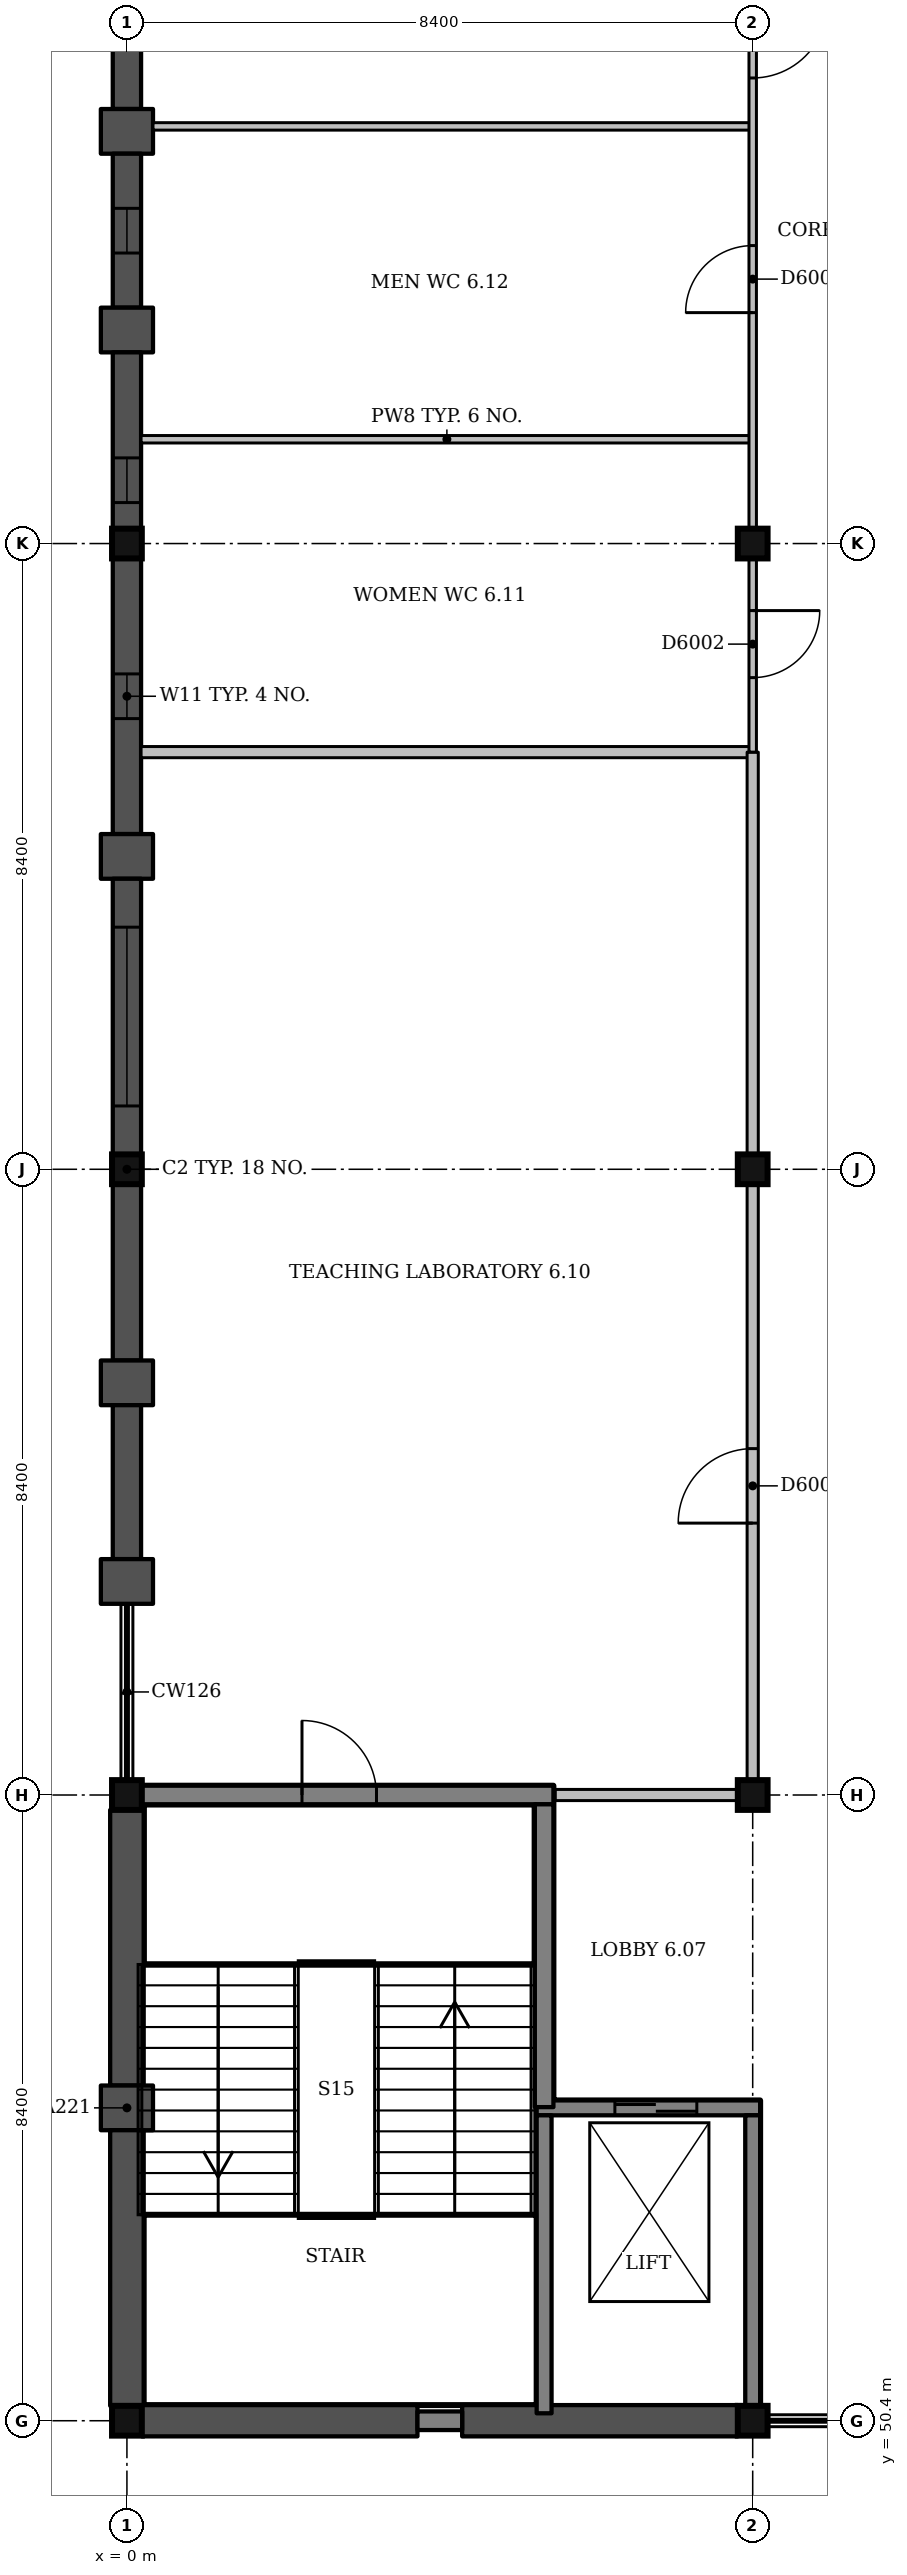
"""IFC4 building model, lengths in metres.
Left out: names, types, materials, properties, quantities, classifications, styles, units other than length and angle.
Written with IfcOpenShell. Run it as: python <this file> out.ifc"""

import sys

from ifc_helpers import new_model, si_unit, direction, frame, frame_2d, origin, origin_2d, place, context, subcontext, project, spatial, rectangle, extrude, element, fill, save


model = new_model("IFC4")
c1 = context("Model", 3, precision=1e-05, world=origin(), true_north=direction((0.0, 1.0)))
c2 = subcontext(c1, "Body", "Model", "MODEL_VIEW")
j1 = project(units=[si_unit("LENGTHUNIT", "METRE"), si_unit("PLANEANGLEUNIT", "RADIAN")], contexts=[c1])
p1 = place(None, origin())
s1 = spatial("IfcSite", under=j1, at=p1, CompositionType="ELEMENT")
p2 = place(p1, origin())
s2 = spatial("IfcBuilding", under=s1, at=p2, CompositionType="ELEMENT")
p3 = place(p2, frame((0.0, 0.0, 27.0)))
s3 = spatial("IfcBuildingStorey", under=s2, at=p3, CompositionType="ELEMENT", Elevation=27.0)
for number, where, z_axis, x_axis in (
    (1, (0.0, 50.4, 0.0), (0.0, 0.0, 1.0), (1.0, 0.0, 0.0)),
    (2, (0.0, 58.8, 0.0), (0.0, 0.0, 1.0), (1.0, 0.0, 0.0)),
    (3, (0.0, 67.2, 0.0), (0.0, 0.0, 1.0), (1.0, 0.0, 0.0)),
    (4, (0.0, 75.6, 0.0), (0.0, 0.0, 1.0), (1.0, 0.0, 0.0)),
    (5, (8.4, 50.4, 0.0), (0.0, 0.0, 1.0), (1.0, 0.0, 0.0)),
    (6, (8.4, 58.8, 0.0), (0.0, 0.0, 1.0), (1.0, 0.0, 0.0)),
    (7, (8.4, 67.2, 0.0), (0.0, 0.0, 1.0), (1.0, 0.0, 0.0)),
    (8, (8.4, 75.6, 0.0), (0.0, 0.0, 1.0), (1.0, 0.0, 0.0)),
):
    element("IfcColumn", number, at=place(p3, frame(where, z_axis=z_axis, x_axis=x_axis)), inside=s3, PredefinedType="COLUMN", context=c2, shape_type="SweptSolid", body=[
        extrude(rectangle(XDim=0.4, YDim=0.4, at=origin_2d()), origin(), (0.0, 0.0, 1.0), 4.5),
    ])
p4 = place(p3, frame((5.5, 54.6, 0.0), z_axis=(0.0, 0.0, 1.0), x_axis=(1.0, 0.0, 0.0)))
e9 = element("IfcWall", 9, at=p4, inside=s3, PredefinedType="SHEAR", context=c2, shape_type="SweptSolid", body=[
    extrude(rectangle(XDim=3.0, YDim=0.2, at=frame_2d((1.5, 0.0))), origin(), (0.0, 0.0, 1.0), 4.5),
])
p5 = place(p4, frame((1.05, 0.0, 0.0)))
e10 = element("IfcOpeningElement", 10, at=p5, cuts=e9, PredefinedType="OPENING", context=c2, shape_type="SweptSolid", body=[
    extrude(rectangle(XDim=1.1, YDim=2.1, at=frame_2d((0.55, 1.05))), frame((0.0, 0.11, 0.0), z_axis=(0.0, -1.0, 0.0), x_axis=(1.0, 0.0, 0.0)), (0.0, 0.0, 1.0), 0.22),
])
p6 = place(p3, frame((5.6, 50.5, 0.0), z_axis=(0.0, 0.0, 1.0), x_axis=(0.0, 1.0, 0.0)))
e11 = element("IfcWall", 11, at=p6, inside=s3, PredefinedType="SHEAR", context=c2, shape_type="SweptSolid", body=[
    extrude(rectangle(XDim=4.0, YDim=0.2, at=frame_2d((2.0, 0.0))), origin(), (0.0, 0.0, 1.0), 4.5),
])
p7 = place(p3, frame((8.4, 50.6, 0.0), z_axis=(0.0, 0.0, 1.0), x_axis=(0.0, 1.0, 0.0)))
e12 = element("IfcWall", 12, at=p7, inside=s3, PredefinedType="SHEAR", context=c2, shape_type="SweptSolid", body=[
    extrude(rectangle(XDim=3.9, YDim=0.2, at=frame_2d((1.95, 0.0))), origin(), (0.0, 0.0, 1.0), 4.5),
])
p8 = place(p3, frame((0.2, 58.8, 0.0), z_axis=(0.0, 0.0, 1.0), x_axis=(1.0, 0.0, 0.0)))
e13 = element("IfcWall", 13, at=p8, inside=s3, PredefinedType="SHEAR", context=c2, shape_type="SweptSolid", body=[
    extrude(rectangle(XDim=5.525, YDim=0.25, at=frame_2d((2.763, 0.0))), origin(), (0.0, 0.0, 1.0), 4.5),
])
p9 = place(p8, frame((2.15, 0.0, 0.0)))
e14 = element("IfcOpeningElement", 14, at=p9, cuts=e13, PredefinedType="OPENING", context=c2, shape_type="SweptSolid", body=[
    extrude(rectangle(XDim=1.0, YDim=2.1, at=frame_2d((0.5, 1.05))), frame((0.0, 0.135, 0.0), z_axis=(0.0, -1.0, 0.0), x_axis=(1.0, 0.0, 0.0)), (0.0, 0.0, 1.0), 0.27),
])
p10 = place(p3, frame((5.6, 54.61, 0.0), z_axis=(0.0, 0.0, 1.0), x_axis=(0.0, 1.0, 0.0)))
e15 = element("IfcWall", 15, at=p10, inside=s3, PredefinedType="SHEAR", context=c2, shape_type="SweptSolid", body=[
    extrude(rectangle(XDim=4.065, YDim=0.25, at=frame_2d((2.032, 0.0))), origin(), (0.0, 0.0, 1.0), 4.5),
])
p11 = place(p3, frame((0.0, 83.8, 0.0), z_axis=(0.0, 0.0, 1.0), x_axis=(0.0, -1.0, 0.0)))
e16 = element("IfcWall", 16, at=p11, inside=s3, PredefinedType="SOLIDWALL", context=c2, shape_type="SweptSolid", body=[
    extrude(rectangle(XDim=2.367, YDim=0.38, at=frame_2d((1.183, 0.0))), origin(), (0.0, 0.0, 1.0), 3.35),
])
p12 = place(p11, frame((0.883, 0.0, 1.5)))
e17 = element("IfcOpeningElement", 17, at=p12, cuts=e16, PredefinedType="OPENING", context=c2, shape_type="SweptSolid", body=[
    extrude(rectangle(XDim=0.6, YDim=1.2, at=frame_2d((0.3, 0.6))), frame((0.0, 0.2, 0.0), z_axis=(0.0, -1.0, 0.0), x_axis=(1.0, 0.0, 0.0)), (0.0, 0.0, 1.0), 0.4),
])
p13 = place(p3, frame((0.0, 81.433, 0.0), z_axis=(0.0, 0.0, 1.0), x_axis=(0.0, -1.0, 0.0)))
e18 = element("IfcWall", 18, at=p13, inside=s3, PredefinedType="SOLIDWALL", context=c2, shape_type="SweptSolid", body=[
    extrude(rectangle(XDim=0.6, YDim=0.7, at=frame_2d((0.3, 0.0))), origin(), (0.0, 0.0, 1.0), 3.35),
])
p14 = place(p3, frame((0.0, 80.833, 0.0), z_axis=(0.0, 0.0, 1.0), x_axis=(0.0, -1.0, 0.0)))
e19 = element("IfcWall", 19, at=p14, inside=s3, PredefinedType="SOLIDWALL", context=c2, shape_type="SweptSolid", body=[
    extrude(rectangle(XDim=2.067, YDim=0.38, at=frame_2d((1.033, 0.0))), origin(), (0.0, 0.0, 1.0), 3.35),
])
p15 = place(p14, frame((0.733, 0.0, 1.5)))
e20 = element("IfcOpeningElement", 20, at=p15, cuts=e19, PredefinedType="OPENING", context=c2, shape_type="SweptSolid", body=[
    extrude(rectangle(XDim=0.6, YDim=1.2, at=frame_2d((0.3, 0.6))), frame((0.0, 0.2, 0.0), z_axis=(0.0, -1.0, 0.0), x_axis=(1.0, 0.0, 0.0)), (0.0, 0.0, 1.0), 0.4),
])
p16 = place(p3, frame((0.0, 78.767, 0.0), z_axis=(0.0, 0.0, 1.0), x_axis=(0.0, -1.0, 0.0)))
e21 = element("IfcWall", 21, at=p16, inside=s3, PredefinedType="SOLIDWALL", context=c2, shape_type="SweptSolid", body=[
    extrude(rectangle(XDim=0.6, YDim=0.7, at=frame_2d((0.3, 0.0))), origin(), (0.0, 0.0, 1.0), 3.35),
])
p17 = place(p3, frame((0.0, 78.167, 0.0), z_axis=(0.0, 0.0, 1.0), x_axis=(0.0, -1.0, 0.0)))
e22 = element("IfcWall", 22, at=p17, inside=s3, PredefinedType="SOLIDWALL", context=c2, shape_type="SweptSolid", body=[
    extrude(rectangle(XDim=2.367, YDim=0.38, at=frame_2d((1.183, 0.0))), origin(), (0.0, 0.0, 1.0), 3.35),
])
p18 = place(p17, frame((1.417, 0.0, 1.5)))
e23 = element("IfcOpeningElement", 23, at=p18, cuts=e22, PredefinedType="OPENING", context=c2, shape_type="SweptSolid", body=[
    extrude(rectangle(XDim=0.6, YDim=1.2, at=frame_2d((0.3, 0.6))), frame((0.0, 0.2, 0.0), z_axis=(0.0, -1.0, 0.0), x_axis=(1.0, 0.0, 0.0)), (0.0, 0.0, 1.0), 0.4),
])
p19 = place(p3, frame((0.0, 75.4, 0.0), z_axis=(0.0, 0.0, 1.0), x_axis=(0.0, -1.0, 0.0)))
e24 = element("IfcWall", 24, at=p19, inside=s3, PredefinedType="SOLIDWALL", context=c2, shape_type="SweptSolid", body=[
    extrude(rectangle(XDim=3.7, YDim=0.38, at=frame_2d((1.85, 0.0))), origin(), (0.0, 0.0, 1.0), 3.35),
])
p20 = place(p19, frame((1.55, 0.0, 1.5)))
e25 = element("IfcOpeningElement", 25, at=p20, cuts=e24, PredefinedType="OPENING", context=c2, shape_type="SweptSolid", body=[
    extrude(rectangle(XDim=0.6, YDim=1.2, at=frame_2d((0.3, 0.6))), frame((0.0, 0.2, 0.0), z_axis=(0.0, -1.0, 0.0), x_axis=(1.0, 0.0, 0.0)), (0.0, 0.0, 1.0), 0.4),
])
p21 = place(p3, frame((0.0, 71.7, 0.0), z_axis=(0.0, 0.0, 1.0), x_axis=(0.0, -1.0, 0.0)))
e26 = element("IfcWall", 26, at=p21, inside=s3, PredefinedType="SOLIDWALL", context=c2, shape_type="SweptSolid", body=[
    extrude(rectangle(XDim=0.6, YDim=0.7, at=frame_2d((0.3, 0.0))), origin(), (0.0, 0.0, 1.0), 3.35),
])
p22 = place(p3, frame((0.0, 71.1, 0.0), z_axis=(0.0, 0.0, 1.0), x_axis=(0.0, -1.0, 0.0)))
e27 = element("IfcWall", 27, at=p22, inside=s3, PredefinedType="SOLIDWALL", context=c2, shape_type="SweptSolid", body=[
    extrude(rectangle(XDim=3.7, YDim=0.38, at=frame_2d((1.85, 0.0))), origin(), (0.0, 0.0, 1.0), 3.35),
])
p23 = place(p22, frame((0.65, 0.0, 1.2)))
e28 = element("IfcOpeningElement", 28, at=p23, cuts=e27, PredefinedType="OPENING", context=c2, shape_type="SweptSolid", body=[
    extrude(rectangle(XDim=2.4, YDim=1.5, at=frame_2d((1.2, 0.75))), frame((0.0, 0.2, 0.0), z_axis=(0.0, -1.0, 0.0), x_axis=(1.0, 0.0, 0.0)), (0.0, 0.0, 1.0), 0.4),
])
p24 = place(p3, frame((0.0, 67.0, 0.0), z_axis=(0.0, 0.0, 1.0), x_axis=(0.0, -1.0, 0.0)))
e29 = element("IfcWall", 29, at=p24, inside=s3, PredefinedType="SOLIDWALL", context=c2, shape_type="SweptSolid", body=[
    extrude(rectangle(XDim=2.367, YDim=0.38, at=frame_2d((1.183, 0.0))), origin(), (0.0, 0.0, 1.0), 3.35),
])
p25 = place(p3, frame((0.0, 64.633, 0.0), z_axis=(0.0, 0.0, 1.0), x_axis=(0.0, -1.0, 0.0)))
e30 = element("IfcWall", 30, at=p25, inside=s3, PredefinedType="SOLIDWALL", context=c2, shape_type="SweptSolid", body=[
    extrude(rectangle(XDim=0.6, YDim=0.7, at=frame_2d((0.3, 0.0))), origin(), (0.0, 0.0, 1.0), 3.35),
])
p26 = place(p3, frame((0.0, 64.033, 0.0), z_axis=(0.0, 0.0, 1.0), x_axis=(0.0, -1.0, 0.0)))
e31 = element("IfcWall", 31, at=p26, inside=s3, PredefinedType="SOLIDWALL", context=c2, shape_type="SweptSolid", body=[
    extrude(rectangle(XDim=2.066, YDim=0.38, at=frame_2d((1.033, 0.0))), origin(), (0.0, 0.0, 1.0), 3.35),
])
p27 = place(p3, frame((0.0, 61.967, 0.0), z_axis=(0.0, 0.0, 1.0), x_axis=(0.0, -1.0, 0.0)))
e32 = element("IfcWall", 32, at=p27, inside=s3, PredefinedType="SOLIDWALL", context=c2, shape_type="SweptSolid", body=[
    extrude(rectangle(XDim=0.6, YDim=0.7, at=frame_2d((0.3, 0.0))), origin(), (0.0, 0.0, 1.0), 3.35),
])
p28 = place(p3, frame((0.0, 58.6, 0.0), z_axis=(0.0, 0.0, 1.0), x_axis=(0.0, -1.0, 0.0)))
e33 = element("IfcWall", 33, at=p28, inside=s3, PredefinedType="SOLIDWALL", context=c2, shape_type="SweptSolid", body=[
    extrude(rectangle(XDim=3.7, YDim=0.45, at=frame_2d((1.85, 0.0))), origin(), (0.0, 0.0, 1.0), 4.5),
])
p29 = place(p3, frame((0.0, 54.9, 0.0), z_axis=(0.0, 0.0, 1.0), x_axis=(0.0, -1.0, 0.0)))
e34 = element("IfcWall", 34, at=p29, inside=s3, PredefinedType="SOLIDWALL", context=c2, shape_type="SweptSolid", body=[
    extrude(rectangle(XDim=0.6, YDim=0.7, at=frame_2d((0.3, 0.0))), origin(), (0.0, 0.0, 1.0), 4.5),
])
p30 = place(p3, frame((0.0, 54.3, 0.0), z_axis=(0.0, 0.0, 1.0), x_axis=(0.0, -1.0, 0.0)))
e35 = element("IfcWall", 35, at=p30, inside=s3, PredefinedType="SOLIDWALL", context=c2, shape_type="SweptSolid", body=[
    extrude(rectangle(XDim=3.7, YDim=0.45, at=frame_2d((1.85, 0.0))), origin(), (0.0, 0.0, 1.0), 4.5),
])
for number, where, z_axis, x_axis in (
    (36, (0.2, 50.4, 0.0), (0.0, 0.0, 1.0), (1.0, 0.0, 0.0)),
    (37, (4.5, 50.4, 0.0), (0.0, 0.0, 1.0), (1.0, 0.0, 0.0)),
):
    element("IfcWall", number, at=place(p3, frame(where, z_axis=z_axis, x_axis=x_axis)), inside=s3, PredefinedType="SOLIDWALL", context=c2, shape_type="SweptSolid", body=[
        extrude(rectangle(XDim=3.7, YDim=0.42, at=frame_2d((1.85, 0.0))), origin(), (0.0, 0.0, 1.0), 3.65),
    ])
p31 = place(p3, frame((5.75, 58.8, 0.0), z_axis=(0.0, 0.0, 1.0), x_axis=(1.0, 0.0, 0.0)))
e38 = element("IfcWall", 38, at=p31, inside=s3, PredefinedType="PARTITIONING", context=c2, shape_type="SweptSolid", body=[
    extrude(rectangle(XDim=2.45, YDim=0.15, at=frame_2d((1.225, 0.0))), origin(), (0.0, 0.0, 1.0), 3.4),
])
p32 = place(p3, frame((0.19, 72.8, 0.0), z_axis=(0.0, 0.0, 1.0), x_axis=(1.0, 0.0, 0.0)))
e39 = element("IfcWall", 39, at=p32, inside=s3, PredefinedType="PARTITIONING", context=c2, shape_type="SweptSolid", body=[
    extrude(rectangle(XDim=8.21, YDim=0.15, at=frame_2d((4.105, 0.0))), origin(), (0.0, 0.0, 1.0), 3.35),
])
p33 = place(p3, frame((0.19, 77.0, 0.0), z_axis=(0.0, 0.0, 1.0), x_axis=(1.0, 0.0, 0.0)))
e40 = element("IfcWall", 40, at=p33, inside=s3, PredefinedType="PARTITIONING", context=c2, shape_type="SweptSolid", body=[
    extrude(rectangle(XDim=8.21, YDim=0.1, at=frame_2d((4.105, 0.0))), origin(), (0.0, 0.0, 1.0), 3.35),
])
p34 = place(p3, frame((0.35, 81.2, 0.0), z_axis=(0.0, 0.0, 1.0), x_axis=(1.0, 0.0, 0.0)))
e41 = element("IfcWall", 41, at=p34, inside=s3, PredefinedType="PARTITIONING", context=c2, shape_type="SweptSolid", body=[
    extrude(rectangle(XDim=8.05, YDim=0.1, at=frame_2d((4.025, 0.0))), origin(), (0.0, 0.0, 1.0), 3.4),
])
p35 = place(p3, frame((8.4, 59.0, 0.0), z_axis=(0.0, 0.0, 1.0), x_axis=(0.0, 1.0, 0.0)))
e42 = element("IfcWall", 42, at=p35, inside=s3, PredefinedType="PARTITIONING", context=c2, shape_type="SweptSolid", body=[
    extrude(rectangle(XDim=8.0, YDim=0.15, at=frame_2d((4.0, 0.0))), origin(), (0.0, 0.0, 1.0), 3.4),
])
p36 = place(p35, frame((3.45, 0.0, 0.0)))
e43 = element("IfcOpeningElement", 43, at=p36, cuts=e42, PredefinedType="OPENING", context=c2, shape_type="SweptSolid", body=[
    extrude(rectangle(XDim=1.0, YDim=2.1, at=frame_2d((0.5, 1.05))), frame((0.0, 0.085, 0.0), z_axis=(0.0, -1.0, 0.0), x_axis=(1.0, 0.0, 0.0)), (0.0, 0.0, 1.0), 0.17),
])
p37 = place(p3, frame((8.4, 67.4, 0.0), z_axis=(0.0, 0.0, 1.0), x_axis=(0.0, 1.0, 0.0)))
e44 = element("IfcWall", 44, at=p37, inside=s3, PredefinedType="PARTITIONING", context=c2, shape_type="SweptSolid", body=[
    extrude(rectangle(XDim=5.4, YDim=0.15, at=frame_2d((2.7, 0.0))), origin(), (0.0, 0.0, 1.0), 3.4),
])
p38 = place(p3, frame((8.4, 72.8, 0.0), z_axis=(0.0, 0.0, 1.0), x_axis=(0.0, 1.0, 0.0)))
e45 = element("IfcWall", 45, at=p38, inside=s3, PredefinedType="PARTITIONING", context=c2, shape_type="SweptSolid", body=[
    extrude(rectangle(XDim=2.6, YDim=0.1, at=frame_2d((1.3, 0.0))), origin(), (0.0, 0.0, 1.0), 3.4),
])
p39 = place(p38, frame((1.0, 0.0, 0.0)))
e46 = element("IfcOpeningElement", 46, at=p39, cuts=e45, PredefinedType="OPENING", context=c2, shape_type="SweptSolid", body=[
    extrude(rectangle(XDim=0.9, YDim=2.1, at=frame_2d((0.45, 1.05))), frame((0.0, 0.06, 0.0), z_axis=(0.0, -1.0, 0.0), x_axis=(1.0, 0.0, 0.0)), (0.0, 0.0, 1.0), 0.12),
])
p40 = place(p3, frame((8.4, 75.8, 0.0), z_axis=(0.0, 0.0, 1.0), x_axis=(0.0, 1.0, 0.0)))
e47 = element("IfcWall", 47, at=p40, inside=s3, PredefinedType="PARTITIONING", context=c2, shape_type="SweptSolid", body=[
    extrude(rectangle(XDim=8.0, YDim=0.1, at=frame_2d((4.0, 0.0))), origin(), (0.0, 0.0, 1.0), 3.4),
])
p41 = place(p40, frame((2.9, 0.0, 0.0)))
e48 = element("IfcOpeningElement", 48, at=p41, cuts=e47, PredefinedType="OPENING", context=c2, shape_type="SweptSolid", body=[
    extrude(rectangle(XDim=0.9, YDim=2.1, at=frame_2d((0.45, 1.05))), frame((0.0, 0.06, 0.0), z_axis=(0.0, -1.0, 0.0), x_axis=(1.0, 0.0, 0.0)), (0.0, 0.0, 1.0), 0.12),
])
p42 = place(p40, frame((6.05, 0.0, 0.0)))
e49 = element("IfcOpeningElement", 49, at=p42, cuts=e47, PredefinedType="OPENING", context=c2, shape_type="SweptSolid", body=[
    extrude(rectangle(XDim=1.0, YDim=2.1, at=frame_2d((0.5, 1.05))), frame((0.0, 0.06, 0.0), z_axis=(0.0, -1.0, 0.0), x_axis=(1.0, 0.0, 0.0)), (0.0, 0.0, 1.0), 0.12),
])
p43 = place(p3, frame((3.9, 50.4, 0.0), z_axis=(0.0, 0.0, 1.0), x_axis=(1.0, 0.0, 0.0)))
e50 = element("IfcWall", 50, at=p43, inside=s3, PredefinedType="SHEAR", context=c2, shape_type="SweptSolid", body=[
    extrude(rectangle(XDim=0.6, YDim=0.25, at=frame_2d((0.3, 0.0))), origin(), (0.0, 0.0, 1.0), 4.5),
])
p44 = place(p15, origin())
e51 = element("IfcWindow", 51, at=p44, inside=s3, PartitioningType="SINGLE_PANEL", PredefinedType="WINDOW", context=c2, shape_type="SweptSolid", body=[
    extrude(rectangle(XDim=0.6, YDim=1.2, at=frame_2d((0.3, 0.6))), frame((0.0, 0.15, 0.0), z_axis=(0.0, -1.0, 0.0), x_axis=(1.0, 0.0, 0.0)), (0.0, 0.0, 1.0), 0.06),
])
fill(e20, e51)
p45 = place(p18, origin())
e52 = element("IfcWindow", 52, at=p45, inside=s3, PartitioningType="SINGLE_PANEL", PredefinedType="WINDOW", context=c2, shape_type="SweptSolid", body=[
    extrude(rectangle(XDim=0.6, YDim=1.2, at=frame_2d((0.3, 0.6))), frame((0.0, 0.15, 0.0), z_axis=(0.0, -1.0, 0.0), x_axis=(1.0, 0.0, 0.0)), (0.0, 0.0, 1.0), 0.06),
])
fill(e23, e52)
p46 = place(p20, origin())
e53 = element("IfcWindow", 53, at=p46, inside=s3, PartitioningType="SINGLE_PANEL", PredefinedType="WINDOW", context=c2, shape_type="SweptSolid", body=[
    extrude(rectangle(XDim=0.6, YDim=1.2, at=frame_2d((0.3, 0.6))), frame((0.0, 0.15, 0.0), z_axis=(0.0, -1.0, 0.0), x_axis=(1.0, 0.0, 0.0)), (0.0, 0.0, 1.0), 0.06),
])
fill(e25, e53)
p47 = place(p23, origin())
e54 = element("IfcWindow", 54, at=p47, inside=s3, PartitioningType="SINGLE_PANEL", PredefinedType="WINDOW", context=c2, shape_type="SweptSolid", body=[
    extrude(rectangle(XDim=2.4, YDim=1.5, at=frame_2d((1.2, 0.75))), frame((0.0, 0.15, 0.0), z_axis=(0.0, -1.0, 0.0), x_axis=(1.0, 0.0, 0.0)), (0.0, 0.0, 1.0), 0.06),
])
fill(e28, e54)
p48 = place(p36, origin())
e55 = element("IfcDoor", 55, at=p48, inside=s3, OperationType="SINGLE_SWING_LEFT", PredefinedType="DOOR", context=c2, shape_type="SweptSolid", body=[
    extrude(rectangle(XDim=1.0, YDim=2.1, at=frame_2d((0.5, 1.05))), frame((0.0, 0.025, 0.0), z_axis=(0.0, -1.0, 0.0), x_axis=(1.0, 0.0, 0.0)), (0.0, 0.0, 1.0), 0.05),
])
fill(e43, e55)
p49 = place(p39, origin())
e56 = element("IfcDoor", 56, at=p49, inside=s3, OperationType="SINGLE_SWING_RIGHT", PredefinedType="DOOR", context=c2, shape_type="SweptSolid", body=[
    extrude(rectangle(XDim=0.9, YDim=2.1, at=frame_2d((0.45, 1.05))), frame((0.0, 0.025, 0.0), z_axis=(0.0, -1.0, 0.0), x_axis=(1.0, 0.0, 0.0)), (0.0, 0.0, 1.0), 0.05),
])
fill(e46, e56)
p50 = place(p41, origin())
e57 = element("IfcDoor", 57, at=p50, inside=s3, OperationType="SINGLE_SWING_LEFT", PredefinedType="DOOR", context=c2, shape_type="SweptSolid", body=[
    extrude(rectangle(XDim=0.9, YDim=2.1, at=frame_2d((0.45, 1.05))), frame((0.0, 0.025, 0.0), z_axis=(0.0, -1.0, 0.0), x_axis=(1.0, 0.0, 0.0)), (0.0, 0.0, 1.0), 0.05),
])
fill(e48, e57)
p51 = place(p42, origin())
e58 = element("IfcDoor", 58, at=p51, inside=s3, OperationType="SINGLE_SWING_RIGHT", PredefinedType="DOOR", context=c2, shape_type="SweptSolid", body=[
    extrude(rectangle(XDim=1.0, YDim=2.1, at=frame_2d((0.5, 1.05))), frame((0.0, 0.025, 0.0), z_axis=(0.0, -1.0, 0.0), x_axis=(1.0, 0.0, 0.0)), (0.0, 0.0, 1.0), 0.05),
])
fill(e49, e58)
p52 = place(p9, origin())
e59 = element("IfcDoor", 59, at=p52, inside=s3, OperationType="SINGLE_SWING_LEFT", PredefinedType="DOOR", context=c2, shape_type="SweptSolid", body=[
    extrude(rectangle(XDim=1.0, YDim=2.1, at=frame_2d((0.5, 1.05))), frame((0.0, 0.025, 0.0), z_axis=(0.0, -1.0, 0.0), x_axis=(1.0, 0.0, 0.0)), (0.0, 0.0, 1.0), 0.05),
])
fill(e14, e59)
p53 = place(p5, origin())
e60 = element("IfcDoor", 60, at=p53, inside=s3, OperationType="SLIDING_TO_LEFT", PredefinedType="DOOR", context=c2, shape_type="SweptSolid", body=[
    extrude(rectangle(XDim=1.1, YDim=2.1, at=frame_2d((0.55, 1.05))), frame((0.0, 0.025, 0.0), z_axis=(0.0, -1.0, 0.0), x_axis=(1.0, 0.0, 0.0)), (0.0, 0.0, 1.0), 0.05),
])
fill(e10, e60)
save(model, sys.argv[1])
